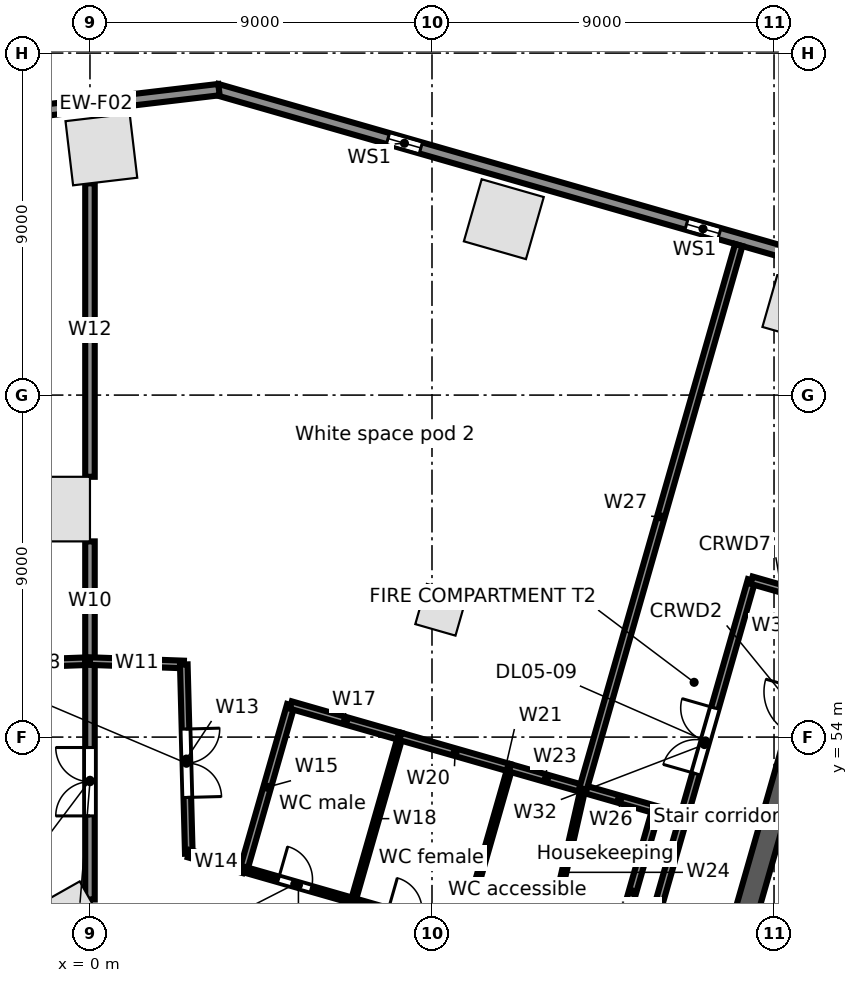
"""IFC4 building model, lengths in metres.
Left out: names, types, materials, properties, quantities, classifications, styles, units other than length and angle.
Written with IfcOpenShell. Run it as: python <this file> out.ifc"""

import sys

from ifc_helpers import new_model, si_unit, direction, frame, frame_2d, origin, origin_2d, place, context, subcontext, project, spatial, rectangle, extrude, element, fill, save


model = new_model("IFC4")
c1 = context("Model", 3, precision=1e-05, world=origin(), true_north=direction((0.0, 1.0)))
c2 = subcontext(c1, "Body", "Model", "MODEL_VIEW")
j1 = project(units=[si_unit("LENGTHUNIT", "METRE"), si_unit("PLANEANGLEUNIT", "RADIAN")], contexts=[c1])
p1 = place(None, origin())
s1 = spatial("IfcSite", under=j1, at=p1, CompositionType="ELEMENT")
p2 = place(p1, origin())
s2 = spatial("IfcBuilding", under=s1, at=p2, CompositionType="ELEMENT")
p3 = place(p2, frame((0.0, 0.0, 36.5)))
s3 = spatial("IfcBuildingStorey", under=s2, at=p3, CompositionType="ELEMENT", Elevation=36.5)
for number, where, z_axis, x_axis in (
    (1, (18.746, 65.376, 0.0), (0.0, 0.0, 1.0), (-0.961, 0.276, 0.0)),
    (2, (10.89, 67.629, 0.0), (0.0, 0.0, 1.0), (-0.961, 0.276, 0.0)),
    (3, (0.3, 69.464, 0.0), (0.0, 0.0, 1.0), (-0.993, -0.118, 0.0)),
    (4, (-0.591, 49.044, 0.0), (0.0, 0.0, 1.0), (0.87, 0.492, 0.0)),
    (5, (-0.85, 60.0, 0.0), (0.0, 0.0, 1.0), (0.0, 1.0, 0.0)),
):
    element("IfcColumn", number, at=place(p3, frame(where, z_axis=z_axis, x_axis=x_axis)), inside=s3, PredefinedType="COLUMN", context=c2, shape_type="SweptSolid", body=[
        extrude(rectangle(XDim=1.7, YDim=1.7, at=origin_2d()), origin(), (0.0, 0.0, 1.0), 5.0),
    ])
p4 = place(p3, frame((9.241, 57.35, 0.0), z_axis=(0.0, 0.0, 1.0), x_axis=(0.961261695938, -0.275637355817, 0.0)))
e6 = element("IfcColumn", 6, at=p4, inside=s3, PredefinedType="COLUMN", context=c2, shape_type="SweptSolid", body=[
    extrude(rectangle(XDim=1.1, YDim=1.1, at=origin_2d()), origin(), (0.0, 0.0, 1.0), 5.0),
])
p5 = place(p3, frame((3.335, 71.044, 0.0), z_axis=(0.0, 0.0, 1.0), x_axis=(0.961260130989, -0.275642813387, 0.0)))
e7 = element("IfcWall", 7, at=p5, inside=s3, PredefinedType="STANDARD", context=c2, shape_type="SweptSolid", body=[
    extrude(rectangle(XDim=32.741, YDim=0.3, at=frame_2d((16.371, 0.0))), origin(), (0.0, 0.0, 1.0), 4.68),
])
p6 = place(p5, frame((29.207, 0.0, 0.6)))
e8 = element("IfcOpeningElement", 8, at=p6, cuts=e7, PredefinedType="OPENING", context=c2, shape_type="SweptSolid", body=[
    extrude(rectangle(XDim=0.9, YDim=3.2, at=frame_2d((0.45, 1.6))), frame((0.0, 0.16, 0.0), z_axis=(0.0, -1.0, 0.0), x_axis=(1.0, 0.0, 0.0)), (0.0, 0.0, 1.0), 0.32),
])
p7 = place(p5, frame((21.034, 0.0, 0.6)))
e9 = element("IfcOpeningElement", 9, at=p7, cuts=e7, PredefinedType="OPENING", context=c2, shape_type="SweptSolid", body=[
    extrude(rectangle(XDim=0.9, YDim=3.2, at=frame_2d((0.45, 1.6))), frame((0.0, 0.16, 0.0), z_axis=(0.0, -1.0, 0.0), x_axis=(1.0, 0.0, 0.0)), (0.0, 0.0, 1.0), 0.32),
])
p8 = place(p5, frame((12.861, 0.0, 0.6)))
e10 = element("IfcOpeningElement", 10, at=p8, cuts=e7, PredefinedType="OPENING", context=c2, shape_type="SweptSolid", body=[
    extrude(rectangle(XDim=0.9, YDim=3.2, at=frame_2d((0.45, 1.6))), frame((0.0, 0.16, 0.0), z_axis=(0.0, -1.0, 0.0), x_axis=(1.0, 0.0, 0.0)), (0.0, 0.0, 1.0), 0.32),
])
p9 = place(p5, frame((4.688, 0.0, 0.6)))
e11 = element("IfcOpeningElement", 11, at=p9, cuts=e7, PredefinedType="OPENING", context=c2, shape_type="SweptSolid", body=[
    extrude(rectangle(XDim=0.9, YDim=3.2, at=frame_2d((0.45, 1.6))), frame((0.0, 0.16, 0.0), z_axis=(0.0, -1.0, 0.0), x_axis=(1.0, 0.0, 0.0)), (0.0, 0.0, 1.0), 0.32),
])
p10 = place(p3, frame((-3.076, 70.273, 0.0), z_axis=(0.0, 0.0, 1.0), x_axis=(0.993067743007, 0.117543429416, 0.0)))
e12 = element("IfcWall", 12, at=p10, inside=s3, PredefinedType="STANDARD", context=c2, shape_type="SweptSolid", body=[
    extrude(rectangle(XDim=6.516, YDim=0.3, at=frame_2d((3.258, 0.0))), origin(), (0.0, 0.0, 1.0), 4.68),
])
p11 = place(p3, frame((17.282, 49.427, 0.0), z_axis=(0.0, 0.0, 1.0), x_axis=(0.275631631629, 0.961263337304, 0.0)))
e13 = element("IfcWall", 13, at=p11, inside=s3, PredefinedType="SOLIDWALL", context=c2, shape_type="SweptSolid", body=[
    extrude(rectangle(XDim=10.8, YDim=0.6, at=frame_2d((5.4, 0.0))), origin(), (0.0, 0.0, 1.0), 4.68),
])
p12 = place(p11, frame((4.8, 0.0, 0.0)))
e14 = element("IfcOpeningElement", 14, at=p12, cuts=e13, PredefinedType="OPENING", context=c2, shape_type="SweptSolid", body=[
    extrude(rectangle(XDim=1.2, YDim=2.1, at=frame_2d((0.6, 1.05))), frame((0.0, 0.31, 0.0), z_axis=(0.0, -1.0, 0.0), x_axis=(1.0, 0.0, 0.0)), (0.0, 0.0, 1.0), 0.62),
])
p13 = place(p3, frame((-2.67, 55.904, 0.0), z_axis=(0.0, 0.0, 1.0), x_axis=(0.999354913865, 0.03591317494, 0.0)))
e15 = element("IfcWall", 15, at=p13, inside=s3, PredefinedType="PARTITIONING", context=c2, shape_type="SweptSolid", body=[
    extrude(rectangle(XDim=2.672, YDim=0.2, at=frame_2d((1.336, 0.0))), origin(), (0.0, 0.0, 1.0), 3.742),
])
p14 = place(p3, frame((0.0, 49.726, 0.0), z_axis=(0.0, 0.0, 1.0), x_axis=(0.0, 1.0, 0.0)))
e16 = element("IfcWall", 16, at=p14, inside=s3, PredefinedType="PARTITIONING", context=c2, shape_type="SweptSolid", body=[
    extrude(rectangle(XDim=6.274, YDim=0.25, at=frame_2d((3.137, 0.0))), origin(), (0.0, 0.0, 1.0), 4.68),
])
p15 = place(p14, frame((2.2, 0.0, 0.0)))
e17 = element("IfcOpeningElement", 17, at=p15, cuts=e16, PredefinedType="OPENING", context=c2, shape_type="SweptSolid", body=[
    extrude(rectangle(XDim=1.8, YDim=2.1, at=frame_2d((0.9, 1.05))), frame((0.0, 0.135, 0.0), z_axis=(0.0, -1.0, 0.0), x_axis=(1.0, 0.0, 0.0)), (0.0, 0.0, 1.0), 0.27),
])
p16 = place(p3, frame((0.0, 56.0, 0.0), z_axis=(0.0, 0.0, 1.0), x_axis=(0.0, 1.0, 0.0)))
e18 = element("IfcWall", 18, at=p16, inside=s3, PredefinedType="PARTITIONING", context=c2, shape_type="SweptSolid", body=[
    extrude(rectangle(XDim=3.15, YDim=0.25, at=frame_2d((1.575, 0.0))), origin(), (0.0, 0.0, 1.0), 4.68),
])
p17 = place(p3, frame((0.0, 56.0, 0.0), z_axis=(0.0, 0.0, 1.0), x_axis=(0.999349313684, -0.036068673934, 0.0)))
e19 = element("IfcWall", 19, at=p17, inside=s3, PredefinedType="PARTITIONING", context=c2, shape_type="SweptSolid", body=[
    extrude(rectangle(XDim=2.471, YDim=0.2, at=frame_2d((1.235, 0.0))), origin(), (0.0, 0.0, 1.0), 4.68),
])
p18 = place(p3, frame((0.0, 60.85, 0.0), z_axis=(0.0, 0.0, 1.0), x_axis=(0.0, 1.0, 0.0)))
e20 = element("IfcWall", 20, at=p18, inside=s3, PredefinedType="PARTITIONING", context=c2, shape_type="SweptSolid", body=[
    extrude(rectangle(XDim=7.723, YDim=0.25, at=frame_2d((3.861, 0.0))), origin(), (0.0, 0.0, 1.0), 3.952),
])
p19 = place(p3, frame((2.469, 55.911, 0.0), z_axis=(0.0, 0.0, 1.0), x_axis=(0.02651808123, -0.999648333849, 0.0)))
e21 = element("IfcWall", 21, at=p19, inside=s3, PredefinedType="PARTITIONING", context=c2, shape_type="SweptSolid", body=[
    extrude(rectangle(XDim=4.981, YDim=0.2, at=frame_2d((2.49, 0.0))), origin(), (0.0, 0.0, 1.0), 4.68),
])
p20 = place(p19, frame((1.7, 0.0, 0.0)))
e22 = element("IfcOpeningElement", 22, at=p20, cuts=e21, PredefinedType="OPENING", context=c2, shape_type="SweptSolid", body=[
    extrude(rectangle(XDim=1.8, YDim=2.1, at=frame_2d((0.9, 1.05))), frame((0.0, 0.11, 0.0), z_axis=(0.0, -1.0, 0.0), x_axis=(1.0, 0.0, 0.0)), (0.0, 0.0, 1.0), 0.22),
])
p21 = place(p3, frame((2.601, 50.932, 0.0), z_axis=(0.0, 0.0, 1.0), x_axis=(0.961197773994, -0.27586018065, 0.0)))
e23 = element("IfcWall", 23, at=p21, inside=s3, PredefinedType="PARTITIONING", context=c2, shape_type="SweptSolid", body=[
    extrude(rectangle(XDim=1.5, YDim=0.2, at=frame_2d((0.75, 0.0))), origin(), (0.0, 0.0, 1.0), 4.68),
])
p22 = place(p3, frame((4.043, 50.518, 0.0), z_axis=(0.0, 0.0, 1.0), x_axis=(0.275745553681, 0.96123066411, 0.0)))
e24 = element("IfcWall", 24, at=p22, inside=s3, PredefinedType="PARTITIONING", context=c2, shape_type="SweptSolid", body=[
    extrude(rectangle(XDim=4.5, YDim=0.2, at=frame_2d((2.25, 0.0))), origin(), (0.0, 0.0, 1.0), 4.68),
])
p23 = place(p3, frame((4.043, 50.518, 0.0), z_axis=(0.0, 0.0, 1.0), x_axis=(0.961247103494, -0.275688240636, 0.0)))
e25 = element("IfcWall", 25, at=p23, inside=s3, PredefinedType="PARTITIONING", context=c2, shape_type="SweptSolid", body=[
    extrude(rectangle(XDim=3.0, YDim=0.15, at=frame_2d((1.5, 0.0))), origin(), (0.0, 0.0, 1.0), 4.68),
])
p24 = place(p23, frame((0.95, 0.0, 0.0)))
e26 = element("IfcOpeningElement", 26, at=p24, cuts=e25, PredefinedType="OPENING", context=c2, shape_type="SweptSolid", body=[
    extrude(rectangle(XDim=0.9, YDim=2.1, at=frame_2d((0.45, 1.05))), frame((0.0, 0.085, 0.0), z_axis=(0.0, -1.0, 0.0), x_axis=(1.0, 0.0, 0.0)), (0.0, 0.0, 1.0), 0.17),
])
p25 = place(p3, frame((5.284, 54.844, 0.0), z_axis=(0.0, 0.0, 1.0), x_axis=(0.961243927922, -0.275699312717, 0.0)))
e27 = element("IfcWall", 27, at=p25, inside=s3, PredefinedType="PARTITIONING", context=c2, shape_type="SweptSolid", body=[
    extrude(rectangle(XDim=2.999, YDim=0.2, at=frame_2d((1.5, 0.0))), origin(), (0.0, 0.0, 1.0), 4.68),
])
p26 = place(p3, frame((6.927, 49.691, 0.0), z_axis=(0.0, 0.0, 1.0), x_axis=(0.275530671241, 0.961292280841, 0.0)))
e28 = element("IfcWall", 28, at=p26, inside=s3, PredefinedType="PARTITIONING", context=c2, shape_type="SweptSolid", body=[
    extrude(rectangle(XDim=4.5, YDim=0.125, at=frame_2d((2.25, 0.0))), origin(), (0.0, 0.0, 1.0), 4.68),
])
p27 = place(p3, frame((6.927, 49.691, 0.0), z_axis=(0.0, 0.0, 1.0), x_axis=(0.961268664977, -0.27561305073, 0.0)))
e29 = element("IfcWall", 29, at=p27, inside=s3, PredefinedType="PARTITIONING", context=c2, shape_type="SweptSolid", body=[
    extrude(rectangle(XDim=3.0, YDim=0.15, at=frame_2d((1.5, 0.0))), origin(), (0.0, 0.0, 1.0), 3.742),
])
p28 = place(p27, frame((0.95, 0.0, 0.0)))
e30 = element("IfcOpeningElement", 30, at=p28, cuts=e29, PredefinedType="OPENING", context=c2, shape_type="SweptSolid", body=[
    extrude(rectangle(XDim=0.9, YDim=2.1, at=frame_2d((0.45, 1.05))), frame((0.0, 0.085, 0.0), z_axis=(0.0, -1.0, 0.0), x_axis=(1.0, 0.0, 0.0)), (0.0, 0.0, 1.0), 0.17),
])
p29 = place(p3, frame((8.167, 54.017, 0.0), z_axis=(0.0, 0.0, 1.0), x_axis=(0.961247103494, -0.275688240636, 0.0)))
e31 = element("IfcWall", 31, at=p29, inside=s3, PredefinedType="PARTITIONING", context=c2, shape_type="SweptSolid", body=[
    extrude(rectangle(XDim=3.0, YDim=0.2, at=frame_2d((1.5, 0.0))), origin(), (0.0, 0.0, 1.0), 3.742),
])
p30 = place(p3, frame((9.811, 48.864, 0.0), z_axis=(0.0, 0.0, 1.0), x_axis=(0.275545040649, 0.96128816209, 0.0)))
e32 = element("IfcWall", 32, at=p30, inside=s3, PredefinedType="PARTITIONING", context=c2, shape_type="SweptSolid", body=[
    extrude(rectangle(XDim=4.5, YDim=0.125, at=frame_2d((2.25, 0.0))), origin(), (0.0, 0.0, 1.0), 4.68),
])
p31 = place(p3, frame((11.051, 53.19, 0.0), z_axis=(0.0, 0.0, 1.0), x_axis=(0.961316434736, -0.275446387355, 0.0)))
e33 = element("IfcWall", 33, at=p31, inside=s3, PredefinedType="PARTITIONING", context=c2, shape_type="SweptSolid", body=[
    extrude(rectangle(XDim=2.0, YDim=0.2, at=frame_2d((1.0, 0.0))), origin(), (0.0, 0.0, 1.0), 4.68),
])
p32 = place(p3, frame((11.973, 48.244, 0.0), z_axis=(0.0, 0.0, 1.0), x_axis=(0.222117362571, 0.975019936845, 0.0)))
e34 = element("IfcWall", 34, at=p32, inside=s3, PredefinedType="PARTITIONING", context=c2, shape_type="SweptSolid", body=[
    extrude(rectangle(XDim=4.508, YDim=0.125, at=frame_2d((2.254, 0.0))), origin(), (0.0, 0.0, 1.0), 4.68),
])
p33 = place(p3, frame((12.974, 52.639, 0.0), z_axis=(0.0, 0.0, 1.0), x_axis=(0.961270097305, -0.275608055084, 0.0)))
e35 = element("IfcWall", 35, at=p33, inside=s3, PredefinedType="PARTITIONING", context=c2, shape_type="SweptSolid", body=[
    extrude(rectangle(XDim=1.999, YDim=0.2, at=frame_2d((1.0, 0.0))), origin(), (0.0, 0.0, 1.0), 4.68),
])
p34 = place(p3, frame((12.974, 52.639, 0.0), z_axis=(0.0, 0.0, 1.0), x_axis=(0.275299463768, 0.961358520662, 0.0)))
e36 = element("IfcWall", 36, at=p34, inside=s3, PredefinedType="PARTITIONING", context=c2, shape_type="SweptSolid", body=[
    extrude(rectangle(XDim=14.885, YDim=0.2, at=frame_2d((7.443, 0.0))), origin(), (0.0, 0.0, 1.0), 3.742),
])
p35 = place(p3, frame((13.656, 47.762, 0.0), z_axis=(0.0, 0.0, 1.0), x_axis=(0.275545040649, 0.96128816209, 0.0)))
e37 = element("IfcWall", 37, at=p35, inside=s3, PredefinedType="PARTITIONING", context=c2, shape_type="SweptSolid", body=[
    extrude(rectangle(XDim=4.5, YDim=0.2, at=frame_2d((2.25, 0.0))), origin(), (0.0, 0.0, 1.0), 4.68),
])
p36 = place(p3, frame((14.928, 49.478, 0.0), z_axis=(0.0, 0.0, 1.0), x_axis=(0.275674053528, 0.961251172281, 0.0)))
e38 = element("IfcWall", 38, at=p36, inside=s3, PredefinedType="PARTITIONING", context=c2, shape_type="SweptSolid", body=[
    extrude(rectangle(XDim=9.0, YDim=0.2, at=frame_2d((4.5, 0.0))), origin(), (0.0, 0.0, 1.0), 3.742),
])
p37 = place(p36, frame((3.7, 0.0, 0.0)))
e39 = element("IfcOpeningElement", 39, at=p37, cuts=e38, PredefinedType="OPENING", context=c2, shape_type="SweptSolid", body=[
    extrude(rectangle(XDim=1.8, YDim=2.1, at=frame_2d((0.9, 1.05))), frame((0.0, 0.11, 0.0), z_axis=(0.0, -1.0, 0.0), x_axis=(1.0, 0.0, 0.0)), (0.0, 0.0, 1.0), 0.22),
])
p38 = place(p3, frame((17.409, 58.129, 0.0), z_axis=(0.0, 0.0, 1.0), x_axis=(0.961253165474, -0.275667103345, 0.0)))
e40 = element("IfcWall", 40, at=p38, inside=s3, PredefinedType="PARTITIONING", context=c2, shape_type="SweptSolid", body=[
    extrude(rectangle(XDim=1.977, YDim=0.2, at=frame_2d((0.988, 0.0))), origin(), (0.0, 0.0, 1.0), 4.68),
])
p39 = place(p8, origin())
e41 = element("IfcWindow", 41, at=p39, inside=s3, PartitioningType="SINGLE_PANEL", PredefinedType="WINDOW", context=c2, shape_type="SweptSolid", body=[
    extrude(rectangle(XDim=0.9, YDim=3.2, at=frame_2d((0.45, 1.6))), frame((0.0, 0.03, 0.0), z_axis=(0.0, -1.0, 0.0), x_axis=(1.0, 0.0, 0.0)), (0.0, 0.0, 1.0), 0.06),
])
fill(e10, e41)
p40 = place(p9, origin())
e42 = element("IfcWindow", 42, at=p40, inside=s3, PartitioningType="SINGLE_PANEL", PredefinedType="WINDOW", context=c2, shape_type="SweptSolid", body=[
    extrude(rectangle(XDim=0.9, YDim=3.2, at=frame_2d((0.45, 1.6))), frame((0.0, 0.03, 0.0), z_axis=(0.0, -1.0, 0.0), x_axis=(1.0, 0.0, 0.0)), (0.0, 0.0, 1.0), 0.06),
])
fill(e11, e42)
p41 = place(p24, origin())
e43 = element("IfcDoor", 43, at=p41, inside=s3, OperationType="SINGLE_SWING_LEFT", PredefinedType="DOOR", context=c2, shape_type="SweptSolid", body=[
    extrude(rectangle(XDim=0.9, YDim=2.1, at=frame_2d((0.45, 1.05))), frame((0.0, 0.025, 0.0), z_axis=(0.0, -1.0, 0.0), x_axis=(1.0, 0.0, 0.0)), (0.0, 0.0, 1.0), 0.05),
])
fill(e26, e43)
p42 = place(p20, origin())
e44 = element("IfcDoor", 44, at=p42, inside=s3, OperationType="DOUBLE_DOOR_SINGLE_SWING", PredefinedType="DOOR", context=c2, shape_type="SweptSolid", body=[
    extrude(rectangle(XDim=1.8, YDim=2.1, at=frame_2d((0.9, 1.05))), frame((0.0, 0.025, 0.0), z_axis=(0.0, -1.0, 0.0), x_axis=(1.0, 0.0, 0.0)), (0.0, 0.0, 1.0), 0.05),
])
fill(e22, e44)
p43 = place(p37, origin())
e45 = element("IfcDoor", 45, at=p43, inside=s3, OperationType="DOUBLE_DOOR_SINGLE_SWING", PredefinedType="DOOR", context=c2, shape_type="SweptSolid", body=[
    extrude(rectangle(XDim=1.8, YDim=2.1, at=frame_2d((0.9, 1.05))), frame((0.0, 0.025, 0.0), z_axis=(0.0, -1.0, 0.0), x_axis=(1.0, 0.0, 0.0)), (0.0, 0.0, 1.0), 0.05),
])
fill(e39, e45)
p44 = place(p15, origin())
e46 = element("IfcDoor", 46, at=p44, inside=s3, OperationType="DOUBLE_DOOR_SINGLE_SWING", PredefinedType="DOOR", context=c2, shape_type="SweptSolid", body=[
    extrude(rectangle(XDim=1.8, YDim=2.1, at=frame_2d((0.9, 1.05))), frame((0.0, 0.025, 0.0), z_axis=(0.0, -1.0, 0.0), x_axis=(1.0, 0.0, 0.0)), (0.0, 0.0, 1.0), 0.05),
])
fill(e17, e46)
save(model, sys.argv[1])
